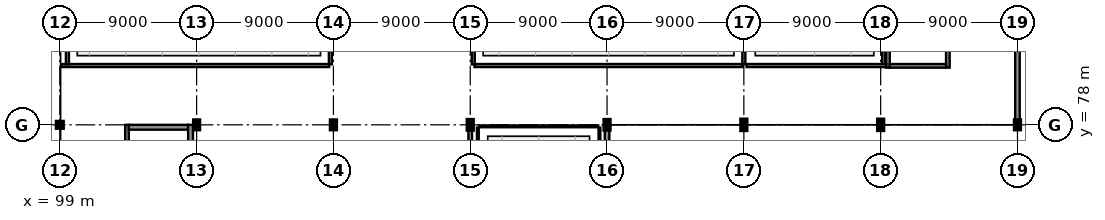
"""IFC4 building model, lengths in metres.
Left out: names, types, materials, properties, quantities, classifications, styles, units other than length and angle.
Written with IfcOpenShell. Run it as: python <this file> out.ifc"""

import sys

from ifc_helpers import new_model, si_unit, direction, frame, frame_2d, origin, origin_2d, place, context, subcontext, project, spatial, rectangle, hollow_circle, i_section, extrude, element, fill, save


model = new_model("IFC4")
c1 = context("Model", 3, precision=1e-05, world=origin(), true_north=direction((0.0, 1.0)))
c2 = subcontext(c1, "Body", "Model", "MODEL_VIEW")
j1 = project(units=[si_unit("LENGTHUNIT", "METRE"), si_unit("PLANEANGLEUNIT", "RADIAN")], contexts=[c1])
p1 = place(None, origin())
s1 = spatial("IfcSite", under=j1, at=p1, CompositionType="ELEMENT")
p2 = place(p1, origin())
s2 = spatial("IfcBuilding", under=s1, at=p2, CompositionType="ELEMENT")
p3 = place(p2, frame((0.0, 0.0, 5.4)))
s3 = spatial("IfcBuildingStorey", under=s2, at=p3, CompositionType="ELEMENT", Elevation=5.4)
p4 = place(p3, frame((99.0, 78.0, 0.0), z_axis=(0.0, 0.0, 1.0), x_axis=(1.0, 0.0, 0.0)))
e1 = element("IfcColumn", 1, at=p4, inside=s3, PredefinedType="PILASTER", context=c2, shape_type="SweptSolid", body=[
    extrude(hollow_circle(Radius=0.178, WallThickness=0.016, at=origin_2d()), origin(), (0.0, 0.0, 1.0), 4.5),
])
for number, where, z_axis, x_axis in (
    (2, (108.0, 78.0, 0.0), (0.0, 0.0, 1.0), (0.0, 1.0, 0.0)),
    (3, (117.0, 78.0, 0.0), (0.0, 0.0, 1.0), (1.0, 0.0, 0.0)),
):
    element("IfcColumn", number, at=place(p3, frame(where, z_axis=z_axis, x_axis=x_axis)), inside=s3, PredefinedType="COLUMN", context=c2, shape_type="SweptSolid", body=[
        extrude(i_section(OverallWidth=0.3, OverallDepth=0.55, WebThickness=0.015, FlangeThickness=0.029, at=origin_2d()), origin(), (0.0, 0.0, 1.0), 4.5),
    ])
for number, where, z_axis, x_axis in (
    (4, (126.0, 78.0, 0.0), (0.0, 0.0, 1.0), (1.0, 0.0, 0.0)),
    (5, (135.0, 78.0, 0.0), (0.0, 0.0, 1.0), (1.0, 0.0, 0.0)),
):
    element("IfcColumn", number, at=place(p3, frame(where, z_axis=z_axis, x_axis=x_axis)), inside=s3, PredefinedType="COLUMN", context=c2, shape_type="SweptSolid", body=[
        extrude(i_section(OverallWidth=0.3, OverallDepth=0.6, WebThickness=0.015, FlangeThickness=0.03, at=origin_2d()), origin(), (0.0, 0.0, 1.0), 4.5),
    ])
for number, where, z_axis, x_axis in (
    (6, (144.0, 78.0, 0.0), (0.0, 0.0, 1.0), (1.0, 0.0, 0.0)),
    (7, (153.0, 78.0, 0.0), (0.0, 0.0, 1.0), (0.0, 1.0, 0.0)),
):
    element("IfcColumn", number, at=place(p3, frame(where, z_axis=z_axis, x_axis=x_axis)), inside=s3, PredefinedType="COLUMN", context=c2, shape_type="SweptSolid", body=[
        extrude(i_section(OverallWidth=0.3, OverallDepth=0.65, WebThickness=0.016, FlangeThickness=0.031, at=origin_2d()), origin(), (0.0, 0.0, 1.0), 4.5),
    ])
p5 = place(p3, frame((162.0, 78.0, 0.0), z_axis=(0.0, 0.0, 1.0), x_axis=(1.0, 0.0, 0.0)))
e8 = element("IfcColumn", 8, at=p5, inside=s3, PredefinedType="COLUMN", context=c2, shape_type="SweptSolid", body=[
    extrude(i_section(OverallWidth=0.3, OverallDepth=0.55, WebThickness=0.015, FlangeThickness=0.029, at=origin_2d()), origin(), (0.0, 0.0, 1.0), 4.5),
])
p6 = place(p3, frame((135.0, 66.158, 0.0), z_axis=(0.0, 0.0, 1.0), x_axis=(0.0, 1.0, 0.0)))
e9 = element("IfcWall", 9, at=p6, inside=s3, PredefinedType="SOLIDWALL", context=c2, shape_type="SweptSolid", body=[
    extrude(rectangle(XDim=11.544, YDim=0.3, at=frame_2d((5.772, 0.0))), origin(), (0.0, 0.0, 1.0), 3.595),
])
p7 = place(p6, frame((2.232, 0.0, 0.8)))
e10 = element("IfcOpeningElement", 10, at=p7, cuts=e9, PredefinedType="OPENING", context=c2, shape_type="SweptSolid", body=[
    extrude(rectangle(XDim=2.0, YDim=2.0, at=frame_2d((1.0, 1.0))), frame((0.0, 0.165, 0.0), z_axis=(0.0, -1.0, 0.0), x_axis=(1.0, 0.0, 0.0)), (0.0, 0.0, 1.0), 0.33),
])
p8 = place(p6, frame((7.312, 0.0, 0.8)))
e11 = element("IfcOpeningElement", 11, at=p8, cuts=e9, PredefinedType="OPENING", context=c2, shape_type="SweptSolid", body=[
    extrude(rectangle(XDim=2.0, YDim=2.0, at=frame_2d((1.0, 1.0))), frame((0.0, 0.165, 0.0), z_axis=(0.0, -1.0, 0.0), x_axis=(1.0, 0.0, 0.0)), (0.0, 0.0, 1.0), 0.33),
])
p9 = place(p3, frame((162.0, 78.273, 0.0), z_axis=(0.0, 0.0, 1.0), x_axis=(0.0, 1.0, 0.0)))
e12 = element("IfcWall", 12, at=p9, inside=s3, PredefinedType="SOLIDWALL", context=c2, shape_type="SweptSolid", body=[
    extrude(rectangle(XDim=17.454, YDim=0.3, at=frame_2d((8.727, 0.0))), origin(), (0.0, 0.0, 1.0), 3.545),
])
p10 = place(p9, frame((4.586, 0.0, 0.9)))
e13 = element("IfcOpeningElement", 13, at=p10, cuts=e12, PredefinedType="OPENING", context=c2, shape_type="SweptSolid", body=[
    extrude(rectangle(XDim=1.3, YDim=1.3, at=frame_2d((0.65, 0.65))), frame((0.0, 0.165, 0.0), z_axis=(0.0, -1.0, 0.0), x_axis=(1.0, 0.0, 0.0)), (0.0, 0.0, 1.0), 0.33),
])
p11 = place(p9, frame((11.568, 0.0, 0.9)))
e14 = element("IfcOpeningElement", 14, at=p11, cuts=e12, PredefinedType="OPENING", context=c2, shape_type="SweptSolid", body=[
    extrude(rectangle(XDim=1.3, YDim=1.3, at=frame_2d((0.65, 0.65))), frame((0.0, 0.165, 0.0), z_axis=(0.0, -1.0, 0.0), x_axis=(1.0, 0.0, 0.0)), (0.0, 0.0, 1.0), 0.33),
])
p12 = place(p3, frame((153.48, 81.76, 0.0), z_axis=(0.0, 0.0, 1.0), x_axis=(0.0, 1.0, 0.0)))
e15 = element("IfcWall", 15, at=p12, inside=s3, PredefinedType="SHEAR", context=c2, shape_type="SweptSolid", body=[
    extrude(rectangle(XDim=8.28, YDim=0.24, at=frame_2d((4.14, 0.0))), origin(), (0.0, 0.0, 1.0), 4.31),
])
p13 = place(p3, frame((157.42, 81.76, 0.0), z_axis=(0.0, 0.0, 1.0), x_axis=(0.0, 1.0, 0.0)))
e16 = element("IfcWall", 16, at=p13, inside=s3, PredefinedType="SHEAR", context=c2, shape_type="SweptSolid", body=[
    extrude(rectangle(XDim=8.28, YDim=0.24, at=frame_2d((4.14, 0.0))), origin(), (0.0, 0.0, 1.0), 4.31),
])
p14 = place(p13, frame((0.49, 0.0, 0.0)))
e17 = element("IfcOpeningElement", 17, at=p14, cuts=e16, PredefinedType="OPENING", context=c2, shape_type="SweptSolid", body=[
    extrude(rectangle(XDim=1.3, YDim=2.2, at=frame_2d((0.65, 1.1))), frame((0.0, 0.135, 0.0), z_axis=(0.0, -1.0, 0.0), x_axis=(1.0, 0.0, 0.0)), (0.0, 0.0, 1.0), 0.27),
])
p15 = place(p3, frame((153.6, 81.88, 0.0), z_axis=(0.0, 0.0, 1.0), x_axis=(1.0, 0.0, 0.0)))
e18 = element("IfcWall", 18, at=p15, inside=s3, PredefinedType="SHEAR", context=c2, shape_type="SweptSolid", body=[
    extrude(rectangle(XDim=3.7, YDim=0.24, at=frame_2d((1.85, 0.0))), origin(), (0.0, 0.0, 1.0), 4.31),
])
p16 = place(p3, frame((103.42, 75.24, 0.0), z_axis=(0.0, 0.0, 1.0), x_axis=(0.0, 1.0, 0.0)))
e19 = element("IfcWall", 19, at=p16, inside=s3, PredefinedType="SHEAR", context=c2, shape_type="SweptSolid", body=[
    extrude(rectangle(XDim=2.76, YDim=0.24, at=frame_2d((1.38, 0.0))), origin(), (0.0, 0.0, 1.0), 4.16),
])
p17 = place(p3, frame((103.54, 77.84, 0.0), z_axis=(0.0, 0.0, 1.0), x_axis=(1.0, 0.0, 0.0)))
e20 = element("IfcWall", 20, at=p17, inside=s3, PredefinedType="SHEAR", context=c2, shape_type="SweptSolid", body=[
    extrude(rectangle(XDim=3.9, YDim=0.32, at=frame_2d((1.95, 0.0))), origin(), (0.0, 0.0, 1.0), 4.16),
])
p18 = place(p17, frame((1.225, 0.0, 0.0)))
e21 = element("IfcOpeningElement", 21, at=p18, cuts=e20, PredefinedType="OPENING", context=c2, shape_type="SweptSolid", body=[
    extrude(rectangle(XDim=1.45, YDim=2.2, at=frame_2d((0.725, 1.1))), frame((0.0, 0.175, 0.0), z_axis=(0.0, -1.0, 0.0), x_axis=(1.0, 0.0, 0.0)), (0.0, 0.0, 1.0), 0.35),
])
p19 = place(p3, frame((107.6, 68.96, 0.0), z_axis=(0.0, 0.0, 1.0), x_axis=(0.0, 1.0, 0.0)))
e22 = element("IfcWall", 22, at=p19, inside=s3, PredefinedType="SHEAR", context=c2, shape_type="SweptSolid", body=[
    extrude(rectangle(XDim=9.04, YDim=0.32, at=frame_2d((4.52, 0.0))), origin(), (0.0, 0.0, 1.0), 4.16),
])
p20 = place(p3, frame((126.0, 66.008, 0.0), z_axis=(0.0, 0.0, 1.0), x_axis=(0.0, 1.0, 0.0)))
e23 = element("IfcWall", 23, at=p20, inside=s3, PredefinedType="SHEAR", context=c2, shape_type="SweptSolid", body=[
    extrude(rectangle(XDim=11.694, YDim=0.24, at=frame_2d((5.847, 0.0))), origin(), (0.0, 0.0, 1.0), 3.645),
])
p21 = place(p3, frame((116.8, 95.727, 0.0), z_axis=(0.0, 0.0, 1.0), x_axis=(0.0, -1.0, 0.0)))
e24 = element("IfcWall", 24, at=p21, inside=s3, PredefinedType="PARTITIONING", context=c2, shape_type="SweptSolid", body=[
    extrude(rectangle(XDim=13.747, YDim=0.2, at=frame_2d((6.874, 0.0))), origin(), (0.0, 0.0, 1.0), 3.545),
])
p22 = place(p3, frame((116.72, 81.9, 0.0), z_axis=(0.0, 0.0, 1.0), x_axis=(-1.0, 0.0, 0.0)))
e25 = element("IfcWall", 25, at=p22, inside=s3, PredefinedType="PARTITIONING", context=c2, shape_type="SweptSolid", body=[
    extrude(rectangle(XDim=17.595, YDim=0.2, at=frame_2d((8.797, 0.0))), origin(), (0.0, 0.0, 1.0), 4.14),
])
p23 = place(p22, frame((7.797, 0.0, 0.0)))
e26 = element("IfcOpeningElement", 26, at=p23, cuts=e25, PredefinedType="OPENING", context=c2, shape_type="SweptSolid", body=[
    extrude(rectangle(XDim=2.0, YDim=2.6, at=frame_2d((1.0, 1.3))), frame((0.0, 0.115, 0.0), z_axis=(0.0, -1.0, 0.0), x_axis=(1.0, 0.0, 0.0)), (0.0, 0.0, 1.0), 0.23),
])
p24 = place(p22, frame((15.545, 0.0, 1.05)))
e27 = element("IfcOpeningElement", 27, at=p24, cuts=e25, PredefinedType="OPENING", context=c2, shape_type="SweptSolid", body=[
    extrude(rectangle(XDim=1.2, YDim=1.0, at=frame_2d((0.6, 0.5))), frame((0.0, 0.115, 0.0), z_axis=(0.0, -1.0, 0.0), x_axis=(1.0, 0.0, 0.0)), (0.0, 0.0, 1.0), 0.23),
])
p25 = place(p3, frame((99.5, 81.98, 0.0), z_axis=(0.0, 0.0, 1.0), x_axis=(0.0, 1.0, 0.0)))
e28 = element("IfcWall", 28, at=p25, inside=s3, PredefinedType="PARTITIONING", context=c2, shape_type="SweptSolid", body=[
    extrude(rectangle(XDim=13.875, YDim=0.2, at=frame_2d((6.938, 0.0))), origin(), (0.0, 0.0, 1.0), 4.14),
])
p26 = place(p3, frame((143.92, 81.9, 0.0), z_axis=(0.0, 0.0, 1.0), x_axis=(-1.0, 0.0, 0.0)))
e29 = element("IfcWall", 29, at=p26, inside=s3, PredefinedType="PARTITIONING", context=c2, shape_type="SweptSolid", body=[
    extrude(rectangle(XDim=17.64, YDim=0.2, at=frame_2d((8.82, 0.0))), origin(), (0.0, 0.0, 1.0), 4.14),
])
p27 = place(p26, frame((7.87, 0.0, 0.0)))
e30 = element("IfcOpeningElement", 30, at=p27, cuts=e29, PredefinedType="OPENING", context=c2, shape_type="SweptSolid", body=[
    extrude(rectangle(XDim=1.9, YDim=2.5, at=frame_2d((0.95, 1.25))), frame((0.0, 0.115, 0.0), z_axis=(0.0, -1.0, 0.0), x_axis=(1.0, 0.0, 0.0)), (0.0, 0.0, 1.0), 0.23),
])
p28 = place(p26, frame((14.69, 0.0, 1.05)))
e31 = element("IfcOpeningElement", 31, at=p28, cuts=e29, PredefinedType="OPENING", context=c2, shape_type="SweptSolid", body=[
    extrude(rectangle(XDim=2.1, YDim=1.2, at=frame_2d((1.05, 0.6))), frame((0.0, 0.115, 0.0), z_axis=(0.0, -1.0, 0.0), x_axis=(1.0, 0.0, 0.0)), (0.0, 0.0, 1.0), 0.23),
])
p29 = place(p3, frame((126.2, 81.98, 0.0), z_axis=(0.0, 0.0, 1.0), x_axis=(0.0, 1.0, 0.0)))
e32 = element("IfcWall", 32, at=p29, inside=s3, PredefinedType="PARTITIONING", context=c2, shape_type="SweptSolid", body=[
    extrude(rectangle(XDim=13.44, YDim=0.2, at=frame_2d((6.72, 0.0))), origin(), (0.0, 0.0, 1.0), 3.495),
])
p30 = place(p3, frame((144.0, 95.42, 0.0), z_axis=(0.0, 0.0, 1.0), x_axis=(0.0, -1.0, 0.0)))
e33 = element("IfcWall", 33, at=p30, inside=s3, PredefinedType="PARTITIONING", context=c2, shape_type="SweptSolid", body=[
    extrude(rectangle(XDim=13.44, YDim=0.2, at=frame_2d((6.72, 0.0))), origin(), (0.0, 0.0, 1.0), 3.405),
])
p31 = place(p3, frame((153.2, 95.42, 0.0), z_axis=(0.0, 0.0, 1.0), x_axis=(0.0, -1.0, 0.0)))
e34 = element("IfcWall", 34, at=p31, inside=s3, PredefinedType="PARTITIONING", context=c2, shape_type="SweptSolid", body=[
    extrude(rectangle(XDim=13.44, YDim=0.2, at=frame_2d((6.72, 0.0))), origin(), (0.0, 0.0, 1.0), 3.395),
])
p32 = place(p3, frame((153.365, 81.9, 0.0), z_axis=(0.0, 0.0, 1.0), x_axis=(-1.0, 0.0, 0.0)))
e35 = element("IfcWall", 35, at=p32, inside=s3, PredefinedType="PARTITIONING", context=c2, shape_type="SweptSolid", body=[
    extrude(rectangle(XDim=9.185, YDim=0.2, at=frame_2d((4.593, 0.0))), origin(), (0.0, 0.0, 1.0), 4.14),
])
p33 = place(p32, frame((3.693, 0.0, 0.0)))
e36 = element("IfcOpeningElement", 36, at=p33, cuts=e35, PredefinedType="OPENING", context=c2, shape_type="SweptSolid", body=[
    extrude(rectangle(XDim=1.8, YDim=2.45, at=frame_2d((0.9, 1.225))), frame((0.0, 0.115, 0.0), z_axis=(0.0, -1.0, 0.0), x_axis=(1.0, 0.0, 0.0)), (0.0, 0.0, 1.0), 0.23),
])
for number, where, z_axis, x_axis in (
    (37, (134.5, 77.82, 0.0), (0.0, 0.0, 1.0), (0.0, -1.0, 0.0)),
    (38, (126.5, 66.075, 0.0), (0.0, 0.0, 1.0), (0.0, 1.0, 0.0)),
):
    element("IfcWall", number, at=place(p3, frame(where, z_axis=z_axis, x_axis=x_axis)), inside=s3, PredefinedType="PARTITIONING", context=c2, shape_type="SweptSolid", body=[
        extrude(rectangle(XDim=11.745, YDim=0.12, at=frame_2d((5.873, 0.0))), origin(), (0.0, 0.0, 1.0), 4.14),
    ])
p34 = place(p3, frame((126.58, 77.9, 0.0), z_axis=(0.0, 0.0, 1.0), x_axis=(1.0, 0.0, 0.0)))
e39 = element("IfcWall", 39, at=p34, inside=s3, PredefinedType="PARTITIONING", context=c2, shape_type="SweptSolid", body=[
    extrude(rectangle(XDim=7.84, YDim=0.12, at=frame_2d((3.92, 0.0))), origin(), (0.0, 0.0, 1.0), 3.755),
])
p35 = place(p34, frame((3.47, 0.0, 0.0)))
e40 = element("IfcOpeningElement", 40, at=p35, cuts=e39, PredefinedType="OPENING", context=c2, shape_type="SweptSolid", body=[
    extrude(rectangle(XDim=0.9, YDim=2.1, at=frame_2d((0.45, 1.05))), frame((0.0, 0.075, 0.0), z_axis=(0.0, -1.0, 0.0), x_axis=(1.0, 0.0, 0.0)), (0.0, 0.0, 1.0), 0.15),
])
p36 = place(p14, frame((1.3, 0.0, 0.0), z_axis=(0.0, 0.0, 1.0), x_axis=(-1.0, 0.0, 0.0)))
e41 = element("IfcDoor", 41, at=p36, inside=s3, OperationType="SINGLE_SWING_RIGHT", PredefinedType="DOOR", context=c2, shape_type="SweptSolid", body=[
    extrude(rectangle(XDim=1.3, YDim=2.2, at=frame_2d((0.65, 1.1))), frame((0.0, 0.025, 0.0), z_axis=(0.0, -1.0, 0.0), x_axis=(1.0, 0.0, 0.0)), (0.0, 0.0, 1.0), 0.05),
])
fill(e17, e41)
p37 = place(p18, origin())
e42 = element("IfcDoor", 42, at=p37, inside=s3, OperationType="DOUBLE_DOOR_SINGLE_SWING", PredefinedType="DOOR", context=c2, shape_type="SweptSolid", body=[
    extrude(rectangle(XDim=1.45, YDim=2.2, at=frame_2d((0.725, 1.1))), frame((0.0, 0.025, 0.0), z_axis=(0.0, -1.0, 0.0), x_axis=(1.0, 0.0, 0.0)), (0.0, 0.0, 1.0), 0.05),
])
fill(e21, e42)
p38 = place(p23, origin())
e43 = element("IfcDoor", 43, at=p38, inside=s3, OperationType="DOUBLE_DOOR_SINGLE_SWING", PredefinedType="DOOR", context=c2, shape_type="SweptSolid", body=[
    extrude(rectangle(XDim=2.0, YDim=2.6, at=frame_2d((1.0, 1.3))), frame((0.0, 0.025, 0.0), z_axis=(0.0, -1.0, 0.0), x_axis=(1.0, 0.0, 0.0)), (0.0, 0.0, 1.0), 0.05),
])
fill(e26, e43)
p39 = place(p24, origin())
e44 = element("IfcWindow", 44, at=p39, inside=s3, PartitioningType="SINGLE_PANEL", PredefinedType="WINDOW", context=c2, shape_type="SweptSolid", body=[
    extrude(rectangle(XDim=1.2, YDim=1.0, at=frame_2d((0.6, 0.5))), frame((0.0, 0.03, 0.0), z_axis=(0.0, -1.0, 0.0), x_axis=(1.0, 0.0, 0.0)), (0.0, 0.0, 1.0), 0.06),
])
fill(e27, e44)
p40 = place(p27, frame((1.9, 0.0, 0.0), z_axis=(0.0, 0.0, 1.0), x_axis=(-1.0, 0.0, 0.0)))
e45 = element("IfcDoor", 45, at=p40, inside=s3, OperationType="DOUBLE_DOOR_SINGLE_SWING", PredefinedType="DOOR", context=c2, shape_type="SweptSolid", body=[
    extrude(rectangle(XDim=1.9, YDim=2.5, at=frame_2d((0.95, 1.25))), frame((0.0, 0.025, 0.0), z_axis=(0.0, -1.0, 0.0), x_axis=(1.0, 0.0, 0.0)), (0.0, 0.0, 1.0), 0.05),
])
fill(e30, e45)
p41 = place(p28, origin())
e46 = element("IfcWindow", 46, at=p41, inside=s3, PartitioningType="SINGLE_PANEL", PredefinedType="WINDOW", context=c2, shape_type="SweptSolid", body=[
    extrude(rectangle(XDim=2.1, YDim=1.2, at=frame_2d((1.05, 0.6))), frame((0.0, 0.03, 0.0), z_axis=(0.0, -1.0, 0.0), x_axis=(1.0, 0.0, 0.0)), (0.0, 0.0, 1.0), 0.06),
])
fill(e31, e46)
p42 = place(p33, origin())
e47 = element("IfcDoor", 47, at=p42, inside=s3, OperationType="DOUBLE_DOOR_SINGLE_SWING", PredefinedType="DOOR", context=c2, shape_type="SweptSolid", body=[
    extrude(rectangle(XDim=1.8, YDim=2.45, at=frame_2d((0.9, 1.225))), frame((0.0, 0.025, 0.0), z_axis=(0.0, -1.0, 0.0), x_axis=(1.0, 0.0, 0.0)), (0.0, 0.0, 1.0), 0.05),
])
fill(e36, e47)
p43 = place(p35, frame((0.9, 0.0, 0.0), z_axis=(0.0, 0.0, 1.0), x_axis=(-1.0, 0.0, 0.0)))
e48 = element("IfcDoor", 48, at=p43, inside=s3, OperationType="SINGLE_SWING_RIGHT", PredefinedType="DOOR", context=c2, shape_type="SweptSolid", body=[
    extrude(rectangle(XDim=0.9, YDim=2.1, at=frame_2d((0.45, 1.05))), frame((0.0, 0.025, 0.0), z_axis=(0.0, -1.0, 0.0), x_axis=(1.0, 0.0, 0.0)), (0.0, 0.0, 1.0), 0.05),
])
fill(e40, e48)
save(model, sys.argv[1])
